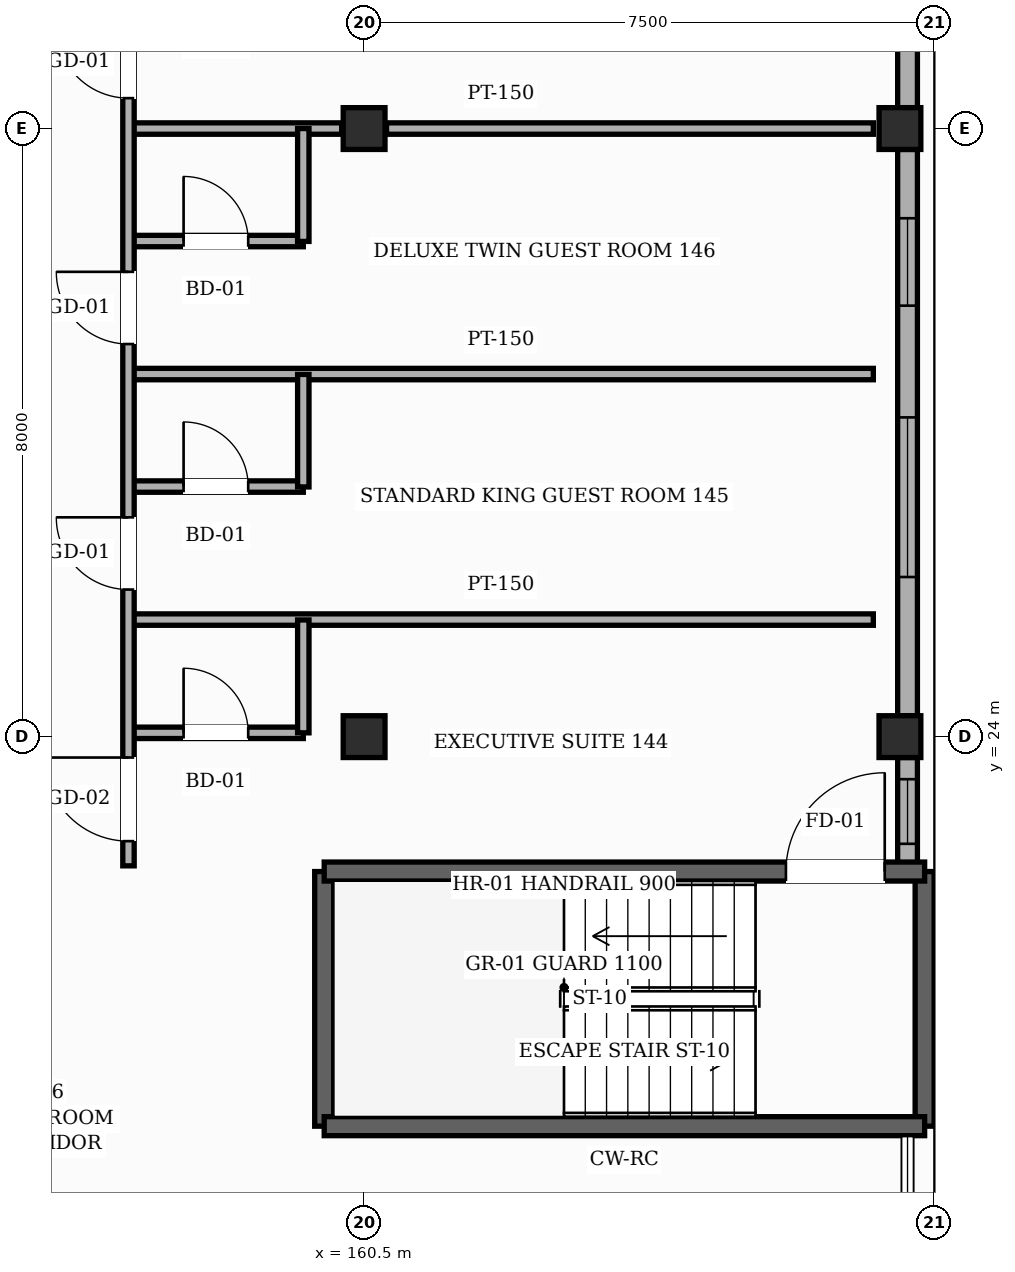
"""IFC4 building model, lengths in metres.
Left out: names, types, materials, properties, quantities, classifications, styles, units other than length and angle.
Written with IfcOpenShell. Run it as: python <this file> out.ifc"""

import sys

from ifc_helpers import new_model, si_unit, direction, frame, frame_2d, origin, origin_2d, place, context, subcontext, project, spatial, rectangle, hollow_rectangle, extrude, element, fill, save


model = new_model("IFC4")
c1 = context("Model", 3, precision=1e-05, world=origin(), true_north=direction((0.0, 1.0)))
c2 = subcontext(c1, "Body", "Model", "MODEL_VIEW")
j1 = project(units=[si_unit("LENGTHUNIT", "METRE"), si_unit("PLANEANGLEUNIT", "RADIAN")], contexts=[c1])
p1 = place(None, origin())
s1 = spatial("IfcSite", under=j1, at=p1, CompositionType="ELEMENT")
p2 = place(p1, origin())
s2 = spatial("IfcBuilding", under=s1, at=p2, CompositionType="ELEMENT")
p3 = place(p2, frame((0.0, 0.0, 28.2)))
s3 = spatial("IfcBuildingStorey", under=s2, at=p3, CompositionType="ELEMENT", Elevation=28.2)
for number, where, z_axis, x_axis in (
    (1, (160.5, 24.0, 0.0), (0.0, 0.0, 1.0), (1.0, 0.0, 0.0)),
    (2, (160.5, 32.0, 0.0), (0.0, 0.0, 1.0), (1.0, 0.0, 0.0)),
    (3, (167.55, 24.0, 0.0), (0.0, 0.0, 1.0), (1.0, 0.0, 0.0)),
    (4, (167.55, 32.0, 0.0), (0.0, 0.0, 1.0), (1.0, 0.0, 0.0)),
):
    element("IfcColumn", number, at=place(p3, frame(where, z_axis=z_axis, x_axis=x_axis)), inside=s3, PredefinedType="COLUMN", context=c2, shape_type="SweptSolid", body=[
        extrude(hollow_rectangle(XDim=0.55, YDim=0.55, WallThickness=0.022, InnerFilletRadius=0.022, OuterFilletRadius=0.044, at=origin_2d()), origin(), (0.0, 0.0, 1.0), 3.6),
    ])
p4 = place(p3, frame((167.65, 23.725, 0.0), z_axis=(0.0, 0.0, 1.0), x_axis=(0.0, -1.0, 0.0)))
e5 = element("IfcWall", 5, at=p4, inside=s3, PredefinedType="SOLIDWALL", context=c2, shape_type="SweptSolid", body=[
    extrude(rectangle(XDim=1.5, YDim=0.26, at=frame_2d((0.75, 0.0))), origin(), (0.0, 0.0, 1.0), 3.365),
])
p5 = place(p4, frame((0.285, 0.0, 0.85)))
e6 = element("IfcOpeningElement", 6, at=p5, cuts=e5, PredefinedType="OPENING", context=c2, shape_type="SweptSolid", body=[
    extrude(rectangle(XDim=0.85, YDim=1.35, at=frame_2d((0.425, 0.675))), frame((0.0, 0.14, 0.0), z_axis=(0.0, -1.0, 0.0), x_axis=(1.0, 0.0, 0.0)), (0.0, 0.0, 1.0), 0.28),
])
p6 = place(p3, frame((167.65, 31.725, 0.0), z_axis=(0.0, 0.0, 1.0), x_axis=(0.0, -1.0, 0.0)))
e7 = element("IfcWall", 7, at=p6, inside=s3, PredefinedType="SOLIDWALL", context=c2, shape_type="SweptSolid", body=[
    extrude(rectangle(XDim=7.45, YDim=0.26, at=frame_2d((3.725, 0.0))), origin(), (0.0, 0.0, 1.0), 2.755),
])
p7 = place(p6, frame((3.525, 0.0, 0.85)))
e8 = element("IfcOpeningElement", 8, at=p7, cuts=e7, PredefinedType="OPENING", context=c2, shape_type="SweptSolid", body=[
    extrude(rectangle(XDim=2.1, YDim=1.35, at=frame_2d((1.05, 0.675))), frame((0.0, 0.14, 0.0), z_axis=(0.0, -1.0, 0.0), x_axis=(1.0, 0.0, 0.0)), (0.0, 0.0, 1.0), 0.28),
])
p8 = place(p6, frame((0.905, 0.0, 0.85)))
e9 = element("IfcOpeningElement", 9, at=p8, cuts=e7, PredefinedType="OPENING", context=c2, shape_type="SweptSolid", body=[
    extrude(rectangle(XDim=1.15, YDim=1.5, at=frame_2d((0.575, 0.75))), frame((0.0, 0.14, 0.0), z_axis=(0.0, -1.0, 0.0), x_axis=(1.0, 0.0, 0.0)), (0.0, 0.0, 1.0), 0.28),
])
p9 = place(p3, frame((167.65, 40.625, 0.0), z_axis=(0.0, 0.0, 1.0), x_axis=(0.0, -1.0, 0.0)))
e10 = element("IfcWall", 10, at=p9, inside=s3, PredefinedType="SOLIDWALL", context=c2, shape_type="SweptSolid", body=[
    extrude(rectangle(XDim=8.35, YDim=0.26, at=frame_2d((4.175, 0.0))), origin(), (0.0, 0.0, 1.0), 2.755),
])
p10 = place(p9, frame((6.195, 0.0, 0.85)))
e11 = element("IfcOpeningElement", 11, at=p10, cuts=e10, PredefinedType="OPENING", context=c2, shape_type="SweptSolid", body=[
    extrude(rectangle(XDim=1.35, YDim=1.5, at=frame_2d((0.675, 0.75))), frame((0.0, 0.14, 0.0), z_axis=(0.0, -1.0, 0.0), x_axis=(1.0, 0.0, 0.0)), (0.0, 0.0, 1.0), 0.28),
])
p11 = place(p9, frame((3.0, 0.0, 0.85)))
e12 = element("IfcOpeningElement", 12, at=p11, cuts=e10, PredefinedType="OPENING", context=c2, shape_type="SweptSolid", body=[
    extrude(rectangle(XDim=1.55, YDim=1.5, at=frame_2d((0.775, 0.75))), frame((0.0, 0.14, 0.0), z_axis=(0.0, -1.0, 0.0), x_axis=(1.0, 0.0, 0.0)), (0.0, 0.0, 1.0), 0.28),
])
p12 = place(p9, frame((0.205, 0.0, 0.85)))
e13 = element("IfcOpeningElement", 13, at=p12, cuts=e10, PredefinedType="OPENING", context=c2, shape_type="SweptSolid", body=[
    extrude(rectangle(XDim=1.75, YDim=1.5, at=frame_2d((0.875, 0.75))), frame((0.0, 0.14, 0.0), z_axis=(0.0, -1.0, 0.0), x_axis=(1.0, 0.0, 0.0)), (0.0, 0.0, 1.0), 0.28),
])
for number, where, z_axis, x_axis in (
    (14, (167.875, 22.225, 0.0), (0.0, 0.0, 1.0), (0.0, -1.0, 0.0)),
    (15, (159.975, 18.875, 0.0), (0.0, 0.0, 1.0), (0.0, 1.0, 0.0)),
):
    element("IfcWall", number, at=place(p3, frame(where, z_axis=z_axis, x_axis=x_axis)), inside=s3, PredefinedType="SHEAR", context=c2, shape_type="SweptSolid", body=[
        extrude(rectangle(XDim=3.35, YDim=0.25, at=frame_2d((1.675, 0.0))), origin(), (0.0, 0.0, 1.0), 3.38),
    ])
p13 = place(p3, frame((159.975, 22.225, 0.0), z_axis=(0.0, 0.0, 1.0), x_axis=(1.0, 0.0, 0.0)))
e16 = element("IfcWall", 16, at=p13, inside=s3, PredefinedType="SHEAR", context=c2, shape_type="SweptSolid", body=[
    extrude(rectangle(XDim=7.9, YDim=0.25, at=frame_2d((3.95, 0.0))), origin(), (0.0, 0.0, 1.0), 3.38),
])
p14 = place(p13, frame((6.075, 0.0, 0.0)))
e17 = element("IfcOpeningElement", 17, at=p14, cuts=e16, PredefinedType="OPENING", context=c2, shape_type="SweptSolid", body=[
    extrude(rectangle(XDim=1.3, YDim=2.2, at=frame_2d((0.65, 1.1))), frame((0.0, 0.135, 0.0), z_axis=(0.0, -1.0, 0.0), x_axis=(1.0, 0.0, 0.0)), (0.0, 0.0, 1.0), 0.27),
])
p15 = place(p3, frame((167.875, 18.875, 0.0), z_axis=(0.0, 0.0, 1.0), x_axis=(-1.0, 0.0, 0.0)))
e18 = element("IfcWall", 18, at=p15, inside=s3, PredefinedType="SHEAR", context=c2, shape_type="SweptSolid", body=[
    extrude(rectangle(XDim=7.9, YDim=0.25, at=frame_2d((3.95, 0.0))), origin(), (0.0, 0.0, 1.0), 3.38),
])
p16 = place(p3, frame((157.4, 24.05, 0.0), z_axis=(0.0, 0.0, 1.0), x_axis=(1.0, 0.0, 0.0)))
e19 = element("IfcWall", 19, at=p16, inside=s3, PredefinedType="PARTITIONING", context=c2, shape_type="SweptSolid", body=[
    extrude(rectangle(XDim=2.3, YDim=0.15, at=frame_2d((1.15, 0.0))), origin(), (0.0, 0.0, 1.0), 2.805),
])
p17 = place(p16, frame((0.725, 0.0, 0.0)))
e20 = element("IfcOpeningElement", 20, at=p17, cuts=e19, PredefinedType="OPENING", context=c2, shape_type="SweptSolid", body=[
    extrude(rectangle(XDim=0.85, YDim=2.1, at=frame_2d((0.425, 1.05))), frame((0.0, 0.085, 0.0), z_axis=(0.0, -1.0, 0.0), x_axis=(1.0, 0.0, 0.0)), (0.0, 0.0, 1.0), 0.17),
])
p18 = place(p3, frame((157.4, 25.54, 0.0), z_axis=(0.0, 0.0, 1.0), x_axis=(1.0, 0.0, 0.0)))
e21 = element("IfcWall", 21, at=p18, inside=s3, PredefinedType="PARTITIONING", context=c2, shape_type="SweptSolid", body=[
    extrude(rectangle(XDim=9.8, YDim=0.15, at=frame_2d((4.9, 0.0))), origin(), (0.0, 0.0, 1.0), 3.365),
])
p19 = place(p3, frame((157.4, 27.29, 0.0), z_axis=(0.0, 0.0, 1.0), x_axis=(1.0, 0.0, 0.0)))
e22 = element("IfcWall", 22, at=p19, inside=s3, PredefinedType="PARTITIONING", context=c2, shape_type="SweptSolid", body=[
    extrude(rectangle(XDim=2.3, YDim=0.15, at=frame_2d((1.15, 0.0))), origin(), (0.0, 0.0, 1.0), 3.365),
])
p20 = place(p19, frame((0.725, 0.0, 0.0)))
e23 = element("IfcOpeningElement", 23, at=p20, cuts=e22, PredefinedType="OPENING", context=c2, shape_type="SweptSolid", body=[
    extrude(rectangle(XDim=0.85, YDim=2.1, at=frame_2d((0.425, 1.05))), frame((0.0, 0.085, 0.0), z_axis=(0.0, -1.0, 0.0), x_axis=(1.0, 0.0, 0.0)), (0.0, 0.0, 1.0), 0.17),
])
p21 = place(p3, frame((157.4, 28.77, 0.0), z_axis=(0.0, 0.0, 1.0), x_axis=(1.0, 0.0, 0.0)))
e24 = element("IfcWall", 24, at=p21, inside=s3, PredefinedType="PARTITIONING", context=c2, shape_type="SweptSolid", body=[
    extrude(rectangle(XDim=9.8, YDim=0.15, at=frame_2d((4.9, 0.0))), origin(), (0.0, 0.0, 1.0), 3.365),
])
p22 = place(p3, frame((157.4, 30.52, 0.0), z_axis=(0.0, 0.0, 1.0), x_axis=(1.0, 0.0, 0.0)))
e25 = element("IfcWall", 25, at=p22, inside=s3, PredefinedType="PARTITIONING", context=c2, shape_type="SweptSolid", body=[
    extrude(rectangle(XDim=2.3, YDim=0.15, at=frame_2d((1.15, 0.0))), origin(), (0.0, 0.0, 1.0), 3.365),
])
p23 = place(p22, frame((0.725, 0.0, 0.0)))
e26 = element("IfcOpeningElement", 26, at=p23, cuts=e25, PredefinedType="OPENING", context=c2, shape_type="SweptSolid", body=[
    extrude(rectangle(XDim=0.85, YDim=2.1, at=frame_2d((0.425, 1.05))), frame((0.0, 0.085, 0.0), z_axis=(0.0, -1.0, 0.0), x_axis=(1.0, 0.0, 0.0)), (0.0, 0.0, 1.0), 0.17),
])
p24 = place(p3, frame((157.4, 32.0, 0.0), z_axis=(0.0, 0.0, 1.0), x_axis=(1.0, 0.0, 0.0)))
e27 = element("IfcWall", 27, at=p24, inside=s3, PredefinedType="PARTITIONING", context=c2, shape_type="SweptSolid", body=[
    extrude(rectangle(XDim=2.805, YDim=0.15, at=frame_2d((1.403, 0.0))), origin(), (0.0, 0.0, 1.0), 2.805),
])
p25 = place(p3, frame((160.795, 32.0, 0.0), z_axis=(0.0, 0.0, 1.0), x_axis=(1.0, 0.0, 0.0)))
e28 = element("IfcWall", 28, at=p25, inside=s3, PredefinedType="PARTITIONING", context=c2, shape_type="SweptSolid", body=[
    extrude(rectangle(XDim=6.405, YDim=0.15, at=frame_2d((3.203, 0.0))), origin(), (0.0, 0.0, 1.0), 2.855),
])
p26 = place(p3, frame((157.4, 22.3, 0.0), z_axis=(0.0, 0.0, 1.0), x_axis=(0.0, 1.0, 0.0)))
e29 = element("IfcWall", 29, at=p26, inside=s3, PredefinedType="PARTITIONING", context=c2, shape_type="SweptSolid", body=[
    extrude(rectangle(XDim=48.5, YDim=0.15, at=frame_2d((24.25, 0.0))), origin(), (0.0, 0.0, 1.0), 3.365),
])
p27 = place(p26, frame((0.325, 0.0, 0.0)))
e30 = element("IfcOpeningElement", 30, at=p27, cuts=e29, PredefinedType="OPENING", context=c2, shape_type="SweptSolid", body=[
    extrude(rectangle(XDim=1.1, YDim=2.2, at=frame_2d((0.55, 1.1))), frame((0.0, 0.085, 0.0), z_axis=(0.0, -1.0, 0.0), x_axis=(1.0, 0.0, 0.0)), (0.0, 0.0, 1.0), 0.17),
])
p28 = place(p26, frame((3.635, 0.0, 0.0)))
e31 = element("IfcOpeningElement", 31, at=p28, cuts=e29, PredefinedType="OPENING", context=c2, shape_type="SweptSolid", body=[
    extrude(rectangle(XDim=0.95, YDim=2.15, at=frame_2d((0.475, 1.075))), frame((0.0, 0.085, 0.0), z_axis=(0.0, -1.0, 0.0), x_axis=(1.0, 0.0, 0.0)), (0.0, 0.0, 1.0), 0.17),
])
p29 = place(p26, frame((6.865, 0.0, 0.0)))
e32 = element("IfcOpeningElement", 32, at=p29, cuts=e29, PredefinedType="OPENING", context=c2, shape_type="SweptSolid", body=[
    extrude(rectangle(XDim=0.95, YDim=2.15, at=frame_2d((0.475, 1.075))), frame((0.0, 0.085, 0.0), z_axis=(0.0, -1.0, 0.0), x_axis=(1.0, 0.0, 0.0)), (0.0, 0.0, 1.0), 0.17),
])
p30 = place(p26, frame((10.1, 0.0, 0.0)))
e33 = element("IfcOpeningElement", 33, at=p30, cuts=e29, PredefinedType="OPENING", context=c2, shape_type="SweptSolid", body=[
    extrude(rectangle(XDim=0.95, YDim=2.15, at=frame_2d((0.475, 1.075))), frame((0.0, 0.085, 0.0), z_axis=(0.0, -1.0, 0.0), x_axis=(1.0, 0.0, 0.0)), (0.0, 0.0, 1.0), 0.17),
])
p31 = place(p26, frame((13.335, 0.0, 0.0)))
e34 = element("IfcOpeningElement", 34, at=p31, cuts=e29, PredefinedType="OPENING", context=c2, shape_type="SweptSolid", body=[
    extrude(rectangle(XDim=0.95, YDim=2.15, at=frame_2d((0.475, 1.075))), frame((0.0, 0.085, 0.0), z_axis=(0.0, -1.0, 0.0), x_axis=(1.0, 0.0, 0.0)), (0.0, 0.0, 1.0), 0.17),
])
p32 = place(p26, frame((16.565, 0.0, 0.0)))
e35 = element("IfcOpeningElement", 35, at=p32, cuts=e29, PredefinedType="OPENING", context=c2, shape_type="SweptSolid", body=[
    extrude(rectangle(XDim=0.95, YDim=2.15, at=frame_2d((0.475, 1.075))), frame((0.0, 0.085, 0.0), z_axis=(0.0, -1.0, 0.0), x_axis=(1.0, 0.0, 0.0)), (0.0, 0.0, 1.0), 0.17),
])
p33 = place(p26, frame((19.8, 0.0, 0.0)))
e36 = element("IfcOpeningElement", 36, at=p33, cuts=e29, PredefinedType="OPENING", context=c2, shape_type="SweptSolid", body=[
    extrude(rectangle(XDim=0.95, YDim=2.15, at=frame_2d((0.475, 1.075))), frame((0.0, 0.085, 0.0), z_axis=(0.0, -1.0, 0.0), x_axis=(1.0, 0.0, 0.0)), (0.0, 0.0, 1.0), 0.17),
])
p34 = place(p26, frame((23.035, 0.0, 0.0)))
e37 = element("IfcOpeningElement", 37, at=p34, cuts=e29, PredefinedType="OPENING", context=c2, shape_type="SweptSolid", body=[
    extrude(rectangle(XDim=0.95, YDim=2.15, at=frame_2d((0.475, 1.075))), frame((0.0, 0.085, 0.0), z_axis=(0.0, -1.0, 0.0), x_axis=(1.0, 0.0, 0.0)), (0.0, 0.0, 1.0), 0.17),
])
p35 = place(p26, frame((26.265, 0.0, 0.0)))
e38 = element("IfcOpeningElement", 38, at=p35, cuts=e29, PredefinedType="OPENING", context=c2, shape_type="SweptSolid", body=[
    extrude(rectangle(XDim=0.95, YDim=2.15, at=frame_2d((0.475, 1.075))), frame((0.0, 0.085, 0.0), z_axis=(0.0, -1.0, 0.0), x_axis=(1.0, 0.0, 0.0)), (0.0, 0.0, 1.0), 0.17),
])
p36 = place(p26, frame((29.5, 0.0, 0.0)))
e39 = element("IfcOpeningElement", 39, at=p36, cuts=e29, PredefinedType="OPENING", context=c2, shape_type="SweptSolid", body=[
    extrude(rectangle(XDim=0.95, YDim=2.15, at=frame_2d((0.475, 1.075))), frame((0.0, 0.085, 0.0), z_axis=(0.0, -1.0, 0.0), x_axis=(1.0, 0.0, 0.0)), (0.0, 0.0, 1.0), 0.17),
])
p37 = place(p26, frame((32.735, 0.0, 0.0)))
e40 = element("IfcOpeningElement", 40, at=p37, cuts=e29, PredefinedType="OPENING", context=c2, shape_type="SweptSolid", body=[
    extrude(rectangle(XDim=0.95, YDim=2.15, at=frame_2d((0.475, 1.075))), frame((0.0, 0.085, 0.0), z_axis=(0.0, -1.0, 0.0), x_axis=(1.0, 0.0, 0.0)), (0.0, 0.0, 1.0), 0.17),
])
p38 = place(p26, frame((35.965, 0.0, 0.0)))
e41 = element("IfcOpeningElement", 41, at=p38, cuts=e29, PredefinedType="OPENING", context=c2, shape_type="SweptSolid", body=[
    extrude(rectangle(XDim=0.95, YDim=2.15, at=frame_2d((0.475, 1.075))), frame((0.0, 0.085, 0.0), z_axis=(0.0, -1.0, 0.0), x_axis=(1.0, 0.0, 0.0)), (0.0, 0.0, 1.0), 0.17),
])
p39 = place(p26, frame((39.2, 0.0, 0.0)))
e42 = element("IfcOpeningElement", 42, at=p39, cuts=e29, PredefinedType="OPENING", context=c2, shape_type="SweptSolid", body=[
    extrude(rectangle(XDim=0.95, YDim=2.15, at=frame_2d((0.475, 1.075))), frame((0.0, 0.085, 0.0), z_axis=(0.0, -1.0, 0.0), x_axis=(1.0, 0.0, 0.0)), (0.0, 0.0, 1.0), 0.17),
])
p40 = place(p26, frame((42.435, 0.0, 0.0)))
e43 = element("IfcOpeningElement", 43, at=p40, cuts=e29, PredefinedType="OPENING", context=c2, shape_type="SweptSolid", body=[
    extrude(rectangle(XDim=0.95, YDim=2.15, at=frame_2d((0.475, 1.075))), frame((0.0, 0.085, 0.0), z_axis=(0.0, -1.0, 0.0), x_axis=(1.0, 0.0, 0.0)), (0.0, 0.0, 1.0), 0.17),
])
p41 = place(p26, frame((45.665, 0.0, 0.0)))
e44 = element("IfcOpeningElement", 44, at=p41, cuts=e29, PredefinedType="OPENING", context=c2, shape_type="SweptSolid", body=[
    extrude(rectangle(XDim=0.95, YDim=2.15, at=frame_2d((0.475, 1.075))), frame((0.0, 0.085, 0.0), z_axis=(0.0, -1.0, 0.0), x_axis=(1.0, 0.0, 0.0)), (0.0, 0.0, 1.0), 0.17),
])
p42 = place(p3, frame((159.7, 24.05, 0.0), z_axis=(0.0, 0.0, 1.0), x_axis=(0.0, 1.0, 0.0)))
e45 = element("IfcWall", 45, at=p42, inside=s3, PredefinedType="PARTITIONING", context=c2, shape_type="SweptSolid", body=[
    extrude(rectangle(XDim=1.485, YDim=0.15, at=frame_2d((0.742, 0.0))), origin(), (0.0, 0.0, 1.0), 3.365),
])
p43 = place(p3, frame((159.7, 27.285, 0.0), z_axis=(0.0, 0.0, 1.0), x_axis=(0.0, 1.0, 0.0)))
e46 = element("IfcWall", 46, at=p43, inside=s3, PredefinedType="PARTITIONING", context=c2, shape_type="SweptSolid", body=[
    extrude(rectangle(XDim=1.48, YDim=0.15, at=frame_2d((0.74, 0.0))), origin(), (0.0, 0.0, 1.0), 3.365),
])
p44 = place(p3, frame((159.7, 30.515, 0.0), z_axis=(0.0, 0.0, 1.0), x_axis=(0.0, 1.0, 0.0)))
e47 = element("IfcWall", 47, at=p44, inside=s3, PredefinedType="PARTITIONING", context=c2, shape_type="SweptSolid", body=[
    extrude(rectangle(XDim=1.485, YDim=0.15, at=frame_2d((0.743, 0.0))), origin(), (0.0, 0.0, 1.0), 3.365),
])
p45 = place(p5, origin())
e48 = element("IfcWindow", 48, at=p45, inside=s3, PartitioningType="SINGLE_PANEL", PredefinedType="WINDOW", context=c2, shape_type="SweptSolid", body=[
    extrude(rectangle(XDim=0.85, YDim=1.35, at=frame_2d((0.425, 0.675))), frame((0.0, 0.03, 0.0), z_axis=(0.0, -1.0, 0.0), x_axis=(1.0, 0.0, 0.0)), (0.0, 0.0, 1.0), 0.06),
])
fill(e6, e48)
p46 = place(p7, origin())
e49 = element("IfcWindow", 49, at=p46, inside=s3, PartitioningType="SINGLE_PANEL", PredefinedType="WINDOW", context=c2, shape_type="SweptSolid", body=[
    extrude(rectangle(XDim=2.1, YDim=1.35, at=frame_2d((1.05, 0.675))), frame((0.0, 0.03, 0.0), z_axis=(0.0, -1.0, 0.0), x_axis=(1.0, 0.0, 0.0)), (0.0, 0.0, 1.0), 0.06),
])
fill(e8, e49)
p47 = place(p8, origin())
e50 = element("IfcWindow", 50, at=p47, inside=s3, PartitioningType="SINGLE_PANEL", PredefinedType="WINDOW", context=c2, shape_type="SweptSolid", body=[
    extrude(rectangle(XDim=1.15, YDim=1.5, at=frame_2d((0.575, 0.75))), frame((0.0, 0.03, 0.0), z_axis=(0.0, -1.0, 0.0), x_axis=(1.0, 0.0, 0.0)), (0.0, 0.0, 1.0), 0.06),
])
fill(e9, e50)
p48 = place(p14, origin())
e51 = element("IfcDoor", 51, at=p48, inside=s3, OperationType="SINGLE_SWING_RIGHT", PredefinedType="DOOR", context=c2, shape_type="SweptSolid", body=[
    extrude(rectangle(XDim=1.3, YDim=2.2, at=frame_2d((0.65, 1.1))), frame((0.0, 0.025, 0.0), z_axis=(0.0, -1.0, 0.0), x_axis=(1.0, 0.0, 0.0)), (0.0, 0.0, 1.0), 0.05),
])
fill(e17, e51)
p49 = place(p27, origin())
e52 = element("IfcDoor", 52, at=p49, inside=s3, OperationType="SINGLE_SWING_RIGHT", PredefinedType="DOOR", context=c2, shape_type="SweptSolid", body=[
    extrude(rectangle(XDim=1.1, YDim=2.2, at=frame_2d((0.55, 1.1))), frame((0.0, 0.025, 0.0), z_axis=(0.0, -1.0, 0.0), x_axis=(1.0, 0.0, 0.0)), (0.0, 0.0, 1.0), 0.05),
])
fill(e30, e52)
p50 = place(p17, origin())
e53 = element("IfcDoor", 53, at=p50, inside=s3, OperationType="SINGLE_SWING_LEFT", PredefinedType="DOOR", context=c2, shape_type="SweptSolid", body=[
    extrude(rectangle(XDim=0.85, YDim=2.1, at=frame_2d((0.425, 1.05))), frame((0.0, 0.025, 0.0), z_axis=(0.0, -1.0, 0.0), x_axis=(1.0, 0.0, 0.0)), (0.0, 0.0, 1.0), 0.05),
])
fill(e20, e53)
p51 = place(p28, origin())
e54 = element("IfcDoor", 54, at=p51, inside=s3, OperationType="SINGLE_SWING_RIGHT", PredefinedType="DOOR", context=c2, shape_type="SweptSolid", body=[
    extrude(rectangle(XDim=0.95, YDim=2.15, at=frame_2d((0.475, 1.075))), frame((0.0, 0.025, 0.0), z_axis=(0.0, -1.0, 0.0), x_axis=(1.0, 0.0, 0.0)), (0.0, 0.0, 1.0), 0.05),
])
fill(e31, e54)
p52 = place(p20, origin())
e55 = element("IfcDoor", 55, at=p52, inside=s3, OperationType="SINGLE_SWING_LEFT", PredefinedType="DOOR", context=c2, shape_type="SweptSolid", body=[
    extrude(rectangle(XDim=0.85, YDim=2.1, at=frame_2d((0.425, 1.05))), frame((0.0, 0.025, 0.0), z_axis=(0.0, -1.0, 0.0), x_axis=(1.0, 0.0, 0.0)), (0.0, 0.0, 1.0), 0.05),
])
fill(e23, e55)
p53 = place(p29, origin())
e56 = element("IfcDoor", 56, at=p53, inside=s3, OperationType="SINGLE_SWING_RIGHT", PredefinedType="DOOR", context=c2, shape_type="SweptSolid", body=[
    extrude(rectangle(XDim=0.95, YDim=2.15, at=frame_2d((0.475, 1.075))), frame((0.0, 0.025, 0.0), z_axis=(0.0, -1.0, 0.0), x_axis=(1.0, 0.0, 0.0)), (0.0, 0.0, 1.0), 0.05),
])
fill(e32, e56)
p54 = place(p23, origin())
e57 = element("IfcDoor", 57, at=p54, inside=s3, OperationType="SINGLE_SWING_LEFT", PredefinedType="DOOR", context=c2, shape_type="SweptSolid", body=[
    extrude(rectangle(XDim=0.85, YDim=2.1, at=frame_2d((0.425, 1.05))), frame((0.0, 0.025, 0.0), z_axis=(0.0, -1.0, 0.0), x_axis=(1.0, 0.0, 0.0)), (0.0, 0.0, 1.0), 0.05),
])
fill(e26, e57)
p55 = place(p30, origin())
e58 = element("IfcDoor", 58, at=p55, inside=s3, OperationType="SINGLE_SWING_RIGHT", PredefinedType="DOOR", context=c2, shape_type="SweptSolid", body=[
    extrude(rectangle(XDim=0.95, YDim=2.15, at=frame_2d((0.475, 1.075))), frame((0.0, 0.025, 0.0), z_axis=(0.0, -1.0, 0.0), x_axis=(1.0, 0.0, 0.0)), (0.0, 0.0, 1.0), 0.05),
])
fill(e33, e58)
save(model, sys.argv[1])
